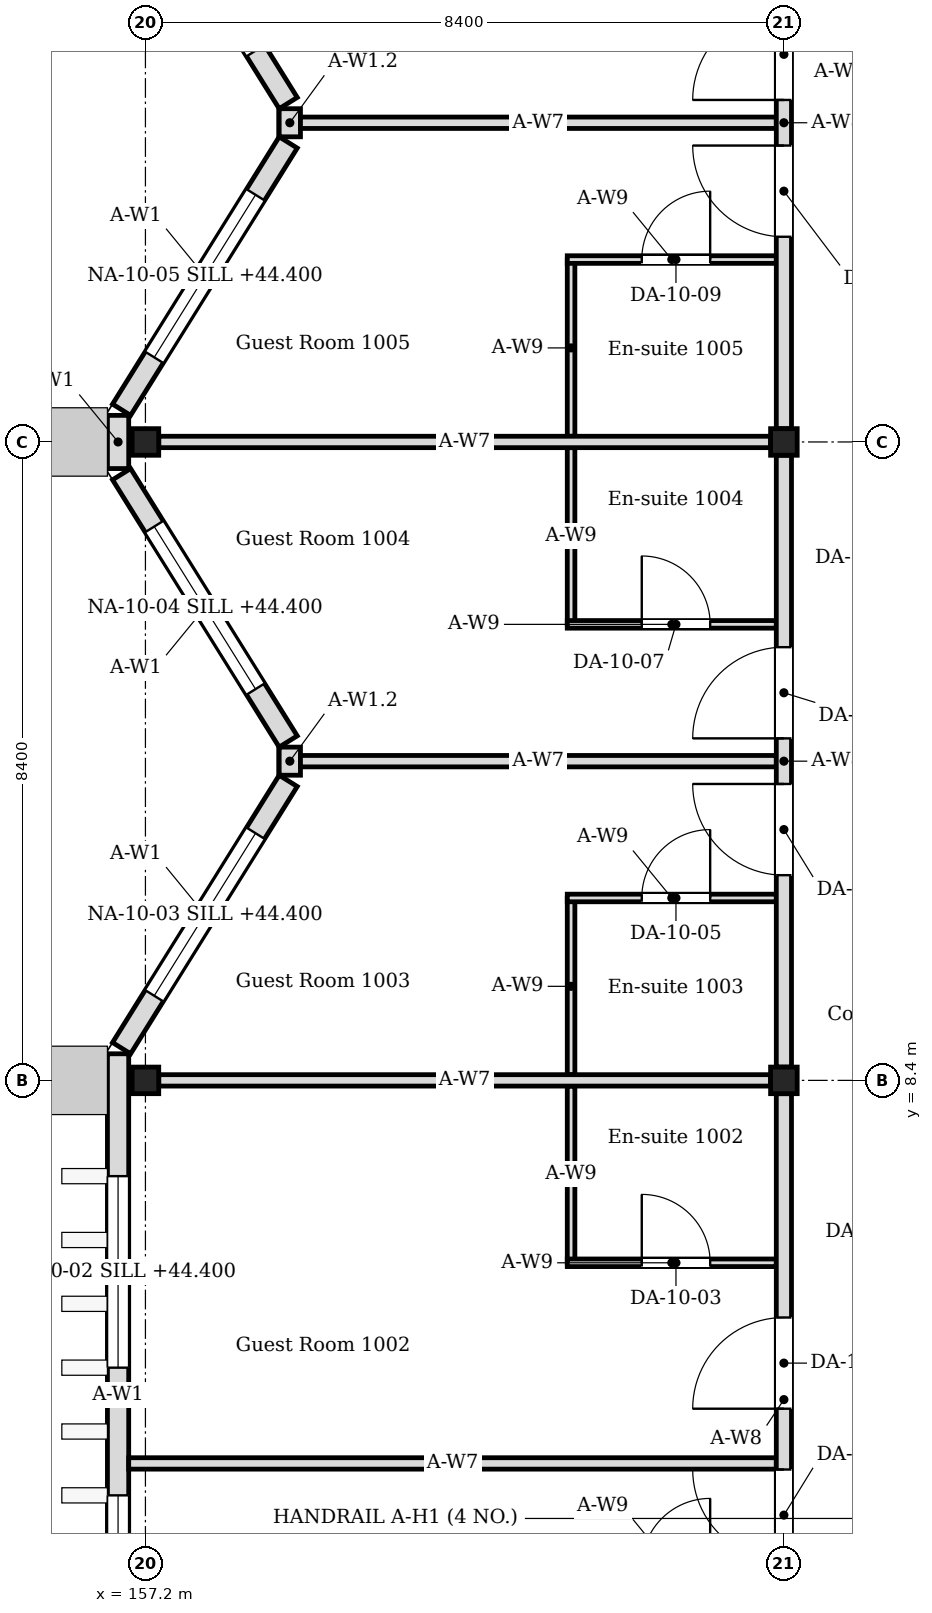
"""IFC4 building model, lengths in metres.
Left out: names, types, materials, properties, quantities, classifications, styles, units other than length and angle.
Written with IfcOpenShell. Run it as: python <this file> out.ifc"""

import sys

from ifc_helpers import new_model, si_unit, direction, frame, frame_2d, origin, origin_2d, place, context, subcontext, project, spatial, rectangle, i_section, extrude, element, fill, save


model = new_model("IFC4")
c1 = context("Model", 3, precision=1e-05, world=origin(), true_north=direction((0.0, 1.0)))
c2 = subcontext(c1, "Body", "Model", "MODEL_VIEW")
j1 = project(units=[si_unit("LENGTHUNIT", "METRE"), si_unit("PLANEANGLEUNIT", "RADIAN")], contexts=[c1])
p1 = place(None, origin())
s1 = spatial("IfcSite", under=j1, at=p1, CompositionType="ELEMENT")
p2 = place(p1, origin())
s2 = spatial("IfcBuilding", under=s1, at=p2, CompositionType="ELEMENT")
p3 = place(p2, frame((0.0, 0.0, 43.8)))
s3 = spatial("IfcBuildingStorey", under=s2, at=p3, CompositionType="ELEMENT", Elevation=43.8)
for number, where, z_axis, x_axis in (
    (1, (157.2, 8.4, 0.0), (0.0, 0.0, 1.0), (1.0, 0.0, 0.0)),
    (2, (157.2, 16.8, 0.0), (0.0, 0.0, 1.0), (1.0, 0.0, 0.0)),
    (3, (165.6, 8.4, 0.0), (0.0, 0.0, 1.0), (1.0, 0.0, 0.0)),
    (4, (165.6, 16.8, 0.0), (0.0, 0.0, 1.0), (1.0, 0.0, 0.0)),
):
    element("IfcColumn", number, at=place(p3, frame(where, z_axis=z_axis, x_axis=x_axis)), inside=s3, PredefinedType="COLUMN", context=c2, shape_type="SweptSolid", body=[
        extrude(i_section(OverallWidth=0.35, OverallDepth=0.35, WebThickness=0.012, FlangeThickness=0.019, FilletRadius=0.013, at=origin_2d()), origin(), (0.0, 0.0, 1.0), 4.2),
    ])
p4 = place(p3, frame((156.84, -0.22, 0.0), z_axis=(0.0, 0.0, 1.0), x_axis=(0.0, 1.0, 0.0)))
e5 = element("IfcWall", 5, at=p4, inside=s3, PredefinedType="SOLIDWALL", context=c2, shape_type="SweptSolid", body=[
    extrude(rectangle(XDim=8.97, YDim=0.28, at=frame_2d((4.485, 0.0))), origin(), (0.0, 0.0, 1.0), 4.05),
])
p5 = place(p4, frame((0.64, 0.0, 0.6)))
e6 = element("IfcOpeningElement", 6, at=p5, cuts=e5, PredefinedType="OPENING", context=c2, shape_type="SweptSolid", body=[
    extrude(rectangle(XDim=2.52, YDim=2.4, at=frame_2d((1.26, 1.2))), frame((0.0, 0.15, 0.0), z_axis=(0.0, -1.0, 0.0), x_axis=(1.0, 0.0, 0.0)), (0.0, 0.0, 1.0), 0.3),
])
p6 = place(p4, frame((4.84, 0.0, 0.6)))
e7 = element("IfcOpeningElement", 7, at=p6, cuts=e5, PredefinedType="OPENING", context=c2, shape_type="SweptSolid", body=[
    extrude(rectangle(XDim=2.52, YDim=2.4, at=frame_2d((1.26, 1.2))), frame((0.0, 0.15, 0.0), z_axis=(0.0, -1.0, 0.0), x_axis=(1.0, 0.0, 0.0)), (0.0, 0.0, 1.0), 0.3),
])
p7 = place(p3, frame((156.886, 8.824, 0.0), z_axis=(0.0, 0.0, 1.0), x_axis=(0.529018946142, 0.848610013271, 0.0)))
e8 = element("IfcWall", 8, at=p7, inside=s3, PredefinedType="SOLIDWALL", context=c2, shape_type="SweptSolid", body=[
    extrude(rectangle(XDim=4.144, YDim=0.28, at=frame_2d((2.072, 0.0))), origin(), (0.0, 0.0, 1.0), 4.05),
])
p8 = place(p7, frame((0.812, 0.0, 0.6)))
e9 = element("IfcOpeningElement", 9, at=p8, cuts=e8, PredefinedType="OPENING", context=c2, shape_type="SweptSolid", body=[
    extrude(rectangle(XDim=2.52, YDim=2.4, at=frame_2d((1.26, 1.2))), frame((0.0, 0.15, 0.0), z_axis=(0.0, -1.0, 0.0), x_axis=(1.0, 0.0, 0.0)), (0.0, 0.0, 1.0), 0.3),
])
p9 = place(p3, frame((159.079, 12.859, 0.0), z_axis=(0.0, 0.0, 1.0), x_axis=(-0.528992500338, 0.848626498871, 0.0)))
e10 = element("IfcWall", 10, at=p9, inside=s3, PredefinedType="SOLIDWALL", context=c2, shape_type="SweptSolid", body=[
    extrude(rectangle(XDim=4.145, YDim=0.28, at=frame_2d((2.072, 0.0))), origin(), (0.0, 0.0, 1.0), 4.05),
])
p10 = place(p9, frame((0.812, 0.0, 0.6)))
e11 = element("IfcOpeningElement", 11, at=p10, cuts=e10, PredefinedType="OPENING", context=c2, shape_type="SweptSolid", body=[
    extrude(rectangle(XDim=2.52, YDim=2.4, at=frame_2d((1.26, 1.2))), frame((0.0, 0.15, 0.0), z_axis=(0.0, -1.0, 0.0), x_axis=(1.0, 0.0, 0.0)), (0.0, 0.0, 1.0), 0.3),
])
p11 = place(p3, frame((159.1, 12.415, 0.0), z_axis=(0.0, 0.0, 1.0), x_axis=(0.0, 1.0, 0.0)))
e12 = element("IfcWall", 12, at=p11, inside=s3, PredefinedType="SOLIDWALL", context=c2, shape_type="SweptSolid", body=[
    extrude(rectangle(XDim=0.37, YDim=0.28, at=frame_2d((0.185, 0.0))), origin(), (0.0, 0.0, 1.0), 3.604),
])
p12 = place(p3, frame((156.84, 16.45, 0.0), z_axis=(0.0, 0.0, 1.0), x_axis=(0.0, 1.0, 0.0)))
e13 = element("IfcWall", 13, at=p12, inside=s3, PredefinedType="SOLIDWALL", context=c2, shape_type="SweptSolid", body=[
    extrude(rectangle(XDim=0.7, YDim=0.28, at=frame_2d((0.35, 0.0))), origin(), (0.0, 0.0, 1.0), 4.05),
])
p13 = place(p3, frame((156.886, 17.224, 0.0), z_axis=(0.0, 0.0, 1.0), x_axis=(0.529018946142, 0.848610013271, 0.0)))
e14 = element("IfcWall", 14, at=p13, inside=s3, PredefinedType="SOLIDWALL", context=c2, shape_type="SweptSolid", body=[
    extrude(rectangle(XDim=4.144, YDim=0.28, at=frame_2d((2.072, 0.0))), origin(), (0.0, 0.0, 1.0), 4.05),
])
p14 = place(p13, frame((0.812, 0.0, 0.6)))
e15 = element("IfcOpeningElement", 15, at=p14, cuts=e14, PredefinedType="OPENING", context=c2, shape_type="SweptSolid", body=[
    extrude(rectangle(XDim=2.52, YDim=2.4, at=frame_2d((1.26, 1.2))), frame((0.0, 0.15, 0.0), z_axis=(0.0, -1.0, 0.0), x_axis=(1.0, 0.0, 0.0)), (0.0, 0.0, 1.0), 0.3),
])
p15 = place(p3, frame((159.079, 21.259, 0.0), z_axis=(0.0, 0.0, 1.0), x_axis=(-0.529018946142, 0.848610013271, 0.0)))
e16 = element("IfcWall", 16, at=p15, inside=s3, PredefinedType="SOLIDWALL", context=c2, shape_type="SweptSolid", body=[
    extrude(rectangle(XDim=4.144, YDim=0.28, at=frame_2d((2.072, 0.0))), origin(), (0.0, 0.0, 1.0), 4.05),
])
p16 = place(p15, frame((0.812, 0.0, 0.6)))
e17 = element("IfcOpeningElement", 17, at=p16, cuts=e16, PredefinedType="OPENING", context=c2, shape_type="SweptSolid", body=[
    extrude(rectangle(XDim=2.52, YDim=2.4, at=frame_2d((1.26, 1.2))), frame((0.0, 0.15, 0.0), z_axis=(0.0, -1.0, 0.0), x_axis=(1.0, 0.0, 0.0)), (0.0, 0.0, 1.0), 0.3),
])
p17 = place(p3, frame((159.1, 20.815, 0.0), z_axis=(0.0, 0.0, 1.0), x_axis=(0.0, 1.0, 0.0)))
e18 = element("IfcWall", 18, at=p17, inside=s3, PredefinedType="SOLIDWALL", context=c2, shape_type="SweptSolid", body=[
    extrude(rectangle(XDim=0.37, YDim=0.28, at=frame_2d((0.185, 0.0))), origin(), (0.0, 0.0, 1.0), 3.604),
])
p18 = place(p3, frame((162.8, 6.0, 0.0), z_axis=(0.0, 0.0, 1.0), x_axis=(0.0, 1.0, 0.0)))
e19 = element("IfcWall", 19, at=p18, inside=s3, PredefinedType="PARTITIONING", context=c2, shape_type="SweptSolid", body=[
    extrude(rectangle(XDim=2.325, YDim=0.1, at=frame_2d((1.163, 0.0))), origin(), (0.0, 0.0, 1.0), 4.05),
])
p19 = place(p3, frame((162.75, 6.0, 0.0), z_axis=(0.0, 0.0, 1.0), x_axis=(1.0, 0.0, 0.0)))
e20 = element("IfcWall", 20, at=p19, inside=s3, PredefinedType="PARTITIONING", context=c2, shape_type="SweptSolid", body=[
    extrude(rectangle(XDim=2.75, YDim=0.1, at=frame_2d((1.375, 0.0))), origin(), (0.0, 0.0, 1.0), 4.05),
])
p20 = place(p19, frame((0.98, 0.0, 0.0)))
e21 = element("IfcOpeningElement", 21, at=p20, cuts=e20, PredefinedType="OPENING", context=c2, shape_type="SweptSolid", body=[
    extrude(rectangle(XDim=0.9, YDim=2.1, at=frame_2d((0.45, 1.05))), frame((0.0, 0.06, 0.0), z_axis=(0.0, -1.0, 0.0), x_axis=(1.0, 0.0, 0.0)), (0.0, 0.0, 1.0), 0.12),
])
p21 = place(p3, frame((162.8, 8.475, 0.0), z_axis=(0.0, 0.0, 1.0), x_axis=(0.0, 1.0, 0.0)))
e22 = element("IfcWall", 22, at=p21, inside=s3, PredefinedType="PARTITIONING", context=c2, shape_type="SweptSolid", body=[
    extrude(rectangle(XDim=2.325, YDim=0.1, at=frame_2d((1.163, 0.0))), origin(), (0.0, 0.0, 1.0), 4.05),
])
p22 = place(p3, frame((162.75, 10.8, 0.0), z_axis=(0.0, 0.0, 1.0), x_axis=(1.0, 0.0, 0.0)))
e23 = element("IfcWall", 23, at=p22, inside=s3, PredefinedType="PARTITIONING", context=c2, shape_type="SweptSolid", body=[
    extrude(rectangle(XDim=2.75, YDim=0.1, at=frame_2d((1.375, 0.0))), origin(), (0.0, 0.0, 1.0), 4.05),
])
p23 = place(p22, frame((0.98, 0.0, 0.0)))
e24 = element("IfcOpeningElement", 24, at=p23, cuts=e23, PredefinedType="OPENING", context=c2, shape_type="SweptSolid", body=[
    extrude(rectangle(XDim=0.9, YDim=2.1, at=frame_2d((0.45, 1.05))), frame((0.0, 0.06, 0.0), z_axis=(0.0, -1.0, 0.0), x_axis=(1.0, 0.0, 0.0)), (0.0, 0.0, 1.0), 0.12),
])
p24 = place(p3, frame((162.8, 14.4, 0.0), z_axis=(0.0, 0.0, 1.0), x_axis=(0.0, 1.0, 0.0)))
e25 = element("IfcWall", 25, at=p24, inside=s3, PredefinedType="PARTITIONING", context=c2, shape_type="SweptSolid", body=[
    extrude(rectangle(XDim=2.325, YDim=0.1, at=frame_2d((1.163, 0.0))), origin(), (0.0, 0.0, 1.0), 4.05),
])
p25 = place(p3, frame((162.75, 14.4, 0.0), z_axis=(0.0, 0.0, 1.0), x_axis=(1.0, 0.0, 0.0)))
e26 = element("IfcWall", 26, at=p25, inside=s3, PredefinedType="PARTITIONING", context=c2, shape_type="SweptSolid", body=[
    extrude(rectangle(XDim=2.75, YDim=0.1, at=frame_2d((1.375, 0.0))), origin(), (0.0, 0.0, 1.0), 4.05),
])
p26 = place(p25, frame((0.98, 0.0, 0.0)))
e27 = element("IfcOpeningElement", 27, at=p26, cuts=e26, PredefinedType="OPENING", context=c2, shape_type="SweptSolid", body=[
    extrude(rectangle(XDim=0.9, YDim=2.1, at=frame_2d((0.45, 1.05))), frame((0.0, 0.06, 0.0), z_axis=(0.0, -1.0, 0.0), x_axis=(1.0, 0.0, 0.0)), (0.0, 0.0, 1.0), 0.12),
])
p27 = place(p3, frame((162.8, 16.875, 0.0), z_axis=(0.0, 0.0, 1.0), x_axis=(0.0, 1.0, 0.0)))
e28 = element("IfcWall", 28, at=p27, inside=s3, PredefinedType="PARTITIONING", context=c2, shape_type="SweptSolid", body=[
    extrude(rectangle(XDim=2.325, YDim=0.1, at=frame_2d((1.163, 0.0))), origin(), (0.0, 0.0, 1.0), 4.05),
])
p28 = place(p3, frame((162.75, 19.2, 0.0), z_axis=(0.0, 0.0, 1.0), x_axis=(1.0, 0.0, 0.0)))
e29 = element("IfcWall", 29, at=p28, inside=s3, PredefinedType="PARTITIONING", context=c2, shape_type="SweptSolid", body=[
    extrude(rectangle(XDim=2.75, YDim=0.1, at=frame_2d((1.375, 0.0))), origin(), (0.0, 0.0, 1.0), 4.05),
])
p29 = place(p28, frame((0.98, 0.0, 0.0)))
e30 = element("IfcOpeningElement", 30, at=p29, cuts=e29, PredefinedType="OPENING", context=c2, shape_type="SweptSolid", body=[
    extrude(rectangle(XDim=0.9, YDim=2.1, at=frame_2d((0.45, 1.05))), frame((0.0, 0.06, 0.0), z_axis=(0.0, -1.0, 0.0), x_axis=(1.0, 0.0, 0.0)), (0.0, 0.0, 1.0), 0.12),
])
for number, where, z_axis, x_axis in (
    (31, (157.375, 8.4, 0.0), (0.0, 0.0, 1.0), (1.0, 0.0, 0.0)),
    (32, (157.375, 16.8, 0.0), (0.0, 0.0, 1.0), (1.0, 0.0, 0.0)),
):
    element("IfcWall", number, at=place(p3, frame(where, z_axis=z_axis, x_axis=x_axis)), inside=s3, PredefinedType="PARTITIONING", context=c2, shape_type="SweptSolid", body=[
        extrude(rectangle(XDim=8.05, YDim=0.15, at=frame_2d((4.025, 0.0))), origin(), (0.0, 0.0, 1.0), 3.604),
    ])
p30 = place(p3, frame((156.98, 3.36, 0.0), z_axis=(0.0, 0.0, 1.0), x_axis=(1.0, 0.0, 0.0)))
e33 = element("IfcWall", 33, at=p30, inside=s3, PredefinedType="PARTITIONING", context=c2, shape_type="SweptSolid", body=[
    extrude(rectangle(XDim=8.52, YDim=0.15, at=frame_2d((4.26, 0.0))), origin(), (0.0, 0.0, 1.0), 3.604),
])
for number, where, z_axis, x_axis in (
    (34, (159.24, 12.6, 0.0), (0.0, 0.0, 1.0), (1.0, 0.0, 0.0)),
    (35, (159.24, 21.0, 0.0), (0.0, 0.0, 1.0), (1.0, 0.0, 0.0)),
):
    element("IfcWall", number, at=place(p3, frame(where, z_axis=z_axis, x_axis=x_axis)), inside=s3, PredefinedType="PARTITIONING", context=c2, shape_type="SweptSolid", body=[
        extrude(rectangle(XDim=6.26, YDim=0.15, at=frame_2d((3.13, 0.0))), origin(), (0.0, 0.0, 1.0), 3.604),
    ])
p31 = place(p3, frame((165.6, 0.175, 0.0), z_axis=(0.0, 0.0, 1.0), x_axis=(0.0, 1.0, 0.0)))
e36 = element("IfcWall", 36, at=p31, inside=s3, PredefinedType="PARTITIONING", context=c2, shape_type="SweptSolid", body=[
    extrude(rectangle(XDim=8.05, YDim=0.2, at=frame_2d((4.025, 0.0))), origin(), (0.0, 0.0, 1.0), 3.45),
])
p32 = place(p31, frame((1.905, 0.0, 0.0)))
e37 = element("IfcOpeningElement", 37, at=p32, cuts=e36, PredefinedType="OPENING", context=c2, shape_type="SweptSolid", body=[
    extrude(rectangle(XDim=1.2, YDim=2.1, at=frame_2d((0.6, 1.05))), frame((0.0, 0.11, 0.0), z_axis=(0.0, -1.0, 0.0), x_axis=(1.0, 0.0, 0.0)), (0.0, 0.0, 1.0), 0.22),
])
p33 = place(p31, frame((3.905, 0.0, 0.0)))
e38 = element("IfcOpeningElement", 38, at=p33, cuts=e36, PredefinedType="OPENING", context=c2, shape_type="SweptSolid", body=[
    extrude(rectangle(XDim=1.2, YDim=2.1, at=frame_2d((0.6, 1.05))), frame((0.0, 0.11, 0.0), z_axis=(0.0, -1.0, 0.0), x_axis=(1.0, 0.0, 0.0)), (0.0, 0.0, 1.0), 0.22),
])
p34 = place(p3, frame((165.6, 8.575, 0.0), z_axis=(0.0, 0.0, 1.0), x_axis=(0.0, 1.0, 0.0)))
e39 = element("IfcWall", 39, at=p34, inside=s3, PredefinedType="PARTITIONING", context=c2, shape_type="SweptSolid", body=[
    extrude(rectangle(XDim=8.05, YDim=0.2, at=frame_2d((4.025, 0.0))), origin(), (0.0, 0.0, 1.0), 3.45),
])
p35 = place(p34, frame((2.525, 0.0, 0.0)))
e40 = element("IfcOpeningElement", 40, at=p35, cuts=e39, PredefinedType="OPENING", context=c2, shape_type="SweptSolid", body=[
    extrude(rectangle(XDim=1.2, YDim=2.1, at=frame_2d((0.6, 1.05))), frame((0.0, 0.11, 0.0), z_axis=(0.0, -1.0, 0.0), x_axis=(1.0, 0.0, 0.0)), (0.0, 0.0, 1.0), 0.22),
])
p36 = place(p34, frame((4.325, 0.0, 0.0)))
e41 = element("IfcOpeningElement", 41, at=p36, cuts=e39, PredefinedType="OPENING", context=c2, shape_type="SweptSolid", body=[
    extrude(rectangle(XDim=1.2, YDim=2.1, at=frame_2d((0.6, 1.05))), frame((0.0, 0.11, 0.0), z_axis=(0.0, -1.0, 0.0), x_axis=(1.0, 0.0, 0.0)), (0.0, 0.0, 1.0), 0.22),
])
p37 = place(p3, frame((165.6, 16.975, 0.0), z_axis=(0.0, 0.0, 1.0), x_axis=(0.0, 1.0, 0.0)))
e42 = element("IfcWall", 42, at=p37, inside=s3, PredefinedType="PARTITIONING", context=c2, shape_type="SweptSolid", body=[
    extrude(rectangle(XDim=8.05, YDim=0.2, at=frame_2d((4.025, 0.0))), origin(), (0.0, 0.0, 1.0), 3.45),
])
p38 = place(p37, frame((2.525, 0.0, 0.0)))
e43 = element("IfcOpeningElement", 43, at=p38, cuts=e42, PredefinedType="OPENING", context=c2, shape_type="SweptSolid", body=[
    extrude(rectangle(XDim=1.2, YDim=2.1, at=frame_2d((0.6, 1.05))), frame((0.0, 0.11, 0.0), z_axis=(0.0, -1.0, 0.0), x_axis=(1.0, 0.0, 0.0)), (0.0, 0.0, 1.0), 0.22),
])
p39 = place(p37, frame((4.325, 0.0, 0.0)))
e44 = element("IfcOpeningElement", 44, at=p39, cuts=e42, PredefinedType="OPENING", context=c2, shape_type="SweptSolid", body=[
    extrude(rectangle(XDim=1.2, YDim=2.1, at=frame_2d((0.6, 1.05))), frame((0.0, 0.11, 0.0), z_axis=(0.0, -1.0, 0.0), x_axis=(1.0, 0.0, 0.0)), (0.0, 0.0, 1.0), 0.22),
])
p40 = place(p5, origin())
e45 = element("IfcWindow", 45, at=p40, inside=s3, PartitioningType="SINGLE_PANEL", PredefinedType="WINDOW", context=c2, shape_type="SweptSolid", body=[
    extrude(rectangle(XDim=2.52, YDim=2.4, at=frame_2d((1.26, 1.2))), frame((0.0, 0.03, 0.0), z_axis=(0.0, -1.0, 0.0), x_axis=(1.0, 0.0, 0.0)), (0.0, 0.0, 1.0), 0.06),
])
fill(e6, e45)
p41 = place(p6, origin())
e46 = element("IfcWindow", 46, at=p41, inside=s3, PartitioningType="SINGLE_PANEL", PredefinedType="WINDOW", context=c2, shape_type="SweptSolid", body=[
    extrude(rectangle(XDim=2.52, YDim=2.4, at=frame_2d((1.26, 1.2))), frame((0.0, 0.03, 0.0), z_axis=(0.0, -1.0, 0.0), x_axis=(1.0, 0.0, 0.0)), (0.0, 0.0, 1.0), 0.06),
])
fill(e7, e46)
p42 = place(p8, origin())
e47 = element("IfcWindow", 47, at=p42, inside=s3, PartitioningType="SINGLE_PANEL", PredefinedType="WINDOW", context=c2, shape_type="SweptSolid", body=[
    extrude(rectangle(XDim=2.52, YDim=2.4, at=frame_2d((1.26, 1.2))), frame((0.0, 0.03, 0.0), z_axis=(0.0, -1.0, 0.0), x_axis=(1.0, 0.0, 0.0)), (0.0, 0.0, 1.0), 0.06),
])
fill(e9, e47)
p43 = place(p10, origin())
e48 = element("IfcWindow", 48, at=p43, inside=s3, PartitioningType="SINGLE_PANEL", PredefinedType="WINDOW", context=c2, shape_type="SweptSolid", body=[
    extrude(rectangle(XDim=2.52, YDim=2.4, at=frame_2d((1.26, 1.2))), frame((0.0, 0.03, 0.0), z_axis=(0.0, -1.0, 0.0), x_axis=(1.0, 0.0, 0.0)), (0.0, 0.0, 1.0), 0.06),
])
fill(e11, e48)
p44 = place(p14, origin())
e49 = element("IfcWindow", 49, at=p44, inside=s3, PartitioningType="SINGLE_PANEL", PredefinedType="WINDOW", context=c2, shape_type="SweptSolid", body=[
    extrude(rectangle(XDim=2.52, YDim=2.4, at=frame_2d((1.26, 1.2))), frame((0.0, 0.03, 0.0), z_axis=(0.0, -1.0, 0.0), x_axis=(1.0, 0.0, 0.0)), (0.0, 0.0, 1.0), 0.06),
])
fill(e15, e49)
p45 = place(p32, origin())
e50 = element("IfcDoor", 50, at=p45, inside=s3, OperationType="SINGLE_SWING_RIGHT", PredefinedType="DOOR", context=c2, shape_type="SweptSolid", body=[
    extrude(rectangle(XDim=1.2, YDim=2.1, at=frame_2d((0.6, 1.05))), frame((0.0, 0.025, 0.0), z_axis=(0.0, -1.0, 0.0), x_axis=(1.0, 0.0, 0.0)), (0.0, 0.0, 1.0), 0.05),
])
fill(e37, e50)
p46 = place(p20, origin())
e51 = element("IfcDoor", 51, at=p46, inside=s3, OperationType="SINGLE_SWING_LEFT", PredefinedType="DOOR", context=c2, shape_type="SweptSolid", body=[
    extrude(rectangle(XDim=0.9, YDim=2.1, at=frame_2d((0.45, 1.05))), frame((0.0, 0.025, 0.0), z_axis=(0.0, -1.0, 0.0), x_axis=(1.0, 0.0, 0.0)), (0.0, 0.0, 1.0), 0.05),
])
fill(e21, e51)
p47 = place(p33, origin())
e52 = element("IfcDoor", 52, at=p47, inside=s3, OperationType="SINGLE_SWING_LEFT", PredefinedType="DOOR", context=c2, shape_type="SweptSolid", body=[
    extrude(rectangle(XDim=1.2, YDim=2.1, at=frame_2d((0.6, 1.05))), frame((0.0, 0.025, 0.0), z_axis=(0.0, -1.0, 0.0), x_axis=(1.0, 0.0, 0.0)), (0.0, 0.0, 1.0), 0.05),
])
fill(e38, e52)
p48 = place(p23, origin())
e53 = element("IfcDoor", 53, at=p48, inside=s3, OperationType="SINGLE_SWING_RIGHT", PredefinedType="DOOR", context=c2, shape_type="SweptSolid", body=[
    extrude(rectangle(XDim=0.9, YDim=2.1, at=frame_2d((0.45, 1.05))), frame((0.0, 0.025, 0.0), z_axis=(0.0, -1.0, 0.0), x_axis=(1.0, 0.0, 0.0)), (0.0, 0.0, 1.0), 0.05),
])
fill(e24, e53)
p49 = place(p35, origin())
e54 = element("IfcDoor", 54, at=p49, inside=s3, OperationType="SINGLE_SWING_RIGHT", PredefinedType="DOOR", context=c2, shape_type="SweptSolid", body=[
    extrude(rectangle(XDim=1.2, YDim=2.1, at=frame_2d((0.6, 1.05))), frame((0.0, 0.025, 0.0), z_axis=(0.0, -1.0, 0.0), x_axis=(1.0, 0.0, 0.0)), (0.0, 0.0, 1.0), 0.05),
])
fill(e40, e54)
p50 = place(p26, origin())
e55 = element("IfcDoor", 55, at=p50, inside=s3, OperationType="SINGLE_SWING_LEFT", PredefinedType="DOOR", context=c2, shape_type="SweptSolid", body=[
    extrude(rectangle(XDim=0.9, YDim=2.1, at=frame_2d((0.45, 1.05))), frame((0.0, 0.025, 0.0), z_axis=(0.0, -1.0, 0.0), x_axis=(1.0, 0.0, 0.0)), (0.0, 0.0, 1.0), 0.05),
])
fill(e27, e55)
p51 = place(p36, origin())
e56 = element("IfcDoor", 56, at=p51, inside=s3, OperationType="SINGLE_SWING_LEFT", PredefinedType="DOOR", context=c2, shape_type="SweptSolid", body=[
    extrude(rectangle(XDim=1.2, YDim=2.1, at=frame_2d((0.6, 1.05))), frame((0.0, 0.025, 0.0), z_axis=(0.0, -1.0, 0.0), x_axis=(1.0, 0.0, 0.0)), (0.0, 0.0, 1.0), 0.05),
])
fill(e41, e56)
p52 = place(p29, origin())
e57 = element("IfcDoor", 57, at=p52, inside=s3, OperationType="SINGLE_SWING_RIGHT", PredefinedType="DOOR", context=c2, shape_type="SweptSolid", body=[
    extrude(rectangle(XDim=0.9, YDim=2.1, at=frame_2d((0.45, 1.05))), frame((0.0, 0.025, 0.0), z_axis=(0.0, -1.0, 0.0), x_axis=(1.0, 0.0, 0.0)), (0.0, 0.0, 1.0), 0.05),
])
fill(e30, e57)
p53 = place(p38, origin())
e58 = element("IfcDoor", 58, at=p53, inside=s3, OperationType="SINGLE_SWING_RIGHT", PredefinedType="DOOR", context=c2, shape_type="SweptSolid", body=[
    extrude(rectangle(XDim=1.2, YDim=2.1, at=frame_2d((0.6, 1.05))), frame((0.0, 0.025, 0.0), z_axis=(0.0, -1.0, 0.0), x_axis=(1.0, 0.0, 0.0)), (0.0, 0.0, 1.0), 0.05),
])
fill(e43, e58)
p54 = place(p39, origin())
e59 = element("IfcDoor", 59, at=p54, inside=s3, OperationType="SINGLE_SWING_LEFT", PredefinedType="DOOR", context=c2, shape_type="SweptSolid", body=[
    extrude(rectangle(XDim=1.2, YDim=2.1, at=frame_2d((0.6, 1.05))), frame((0.0, 0.025, 0.0), z_axis=(0.0, -1.0, 0.0), x_axis=(1.0, 0.0, 0.0)), (0.0, 0.0, 1.0), 0.05),
])
fill(e44, e59)
save(model, sys.argv[1])
